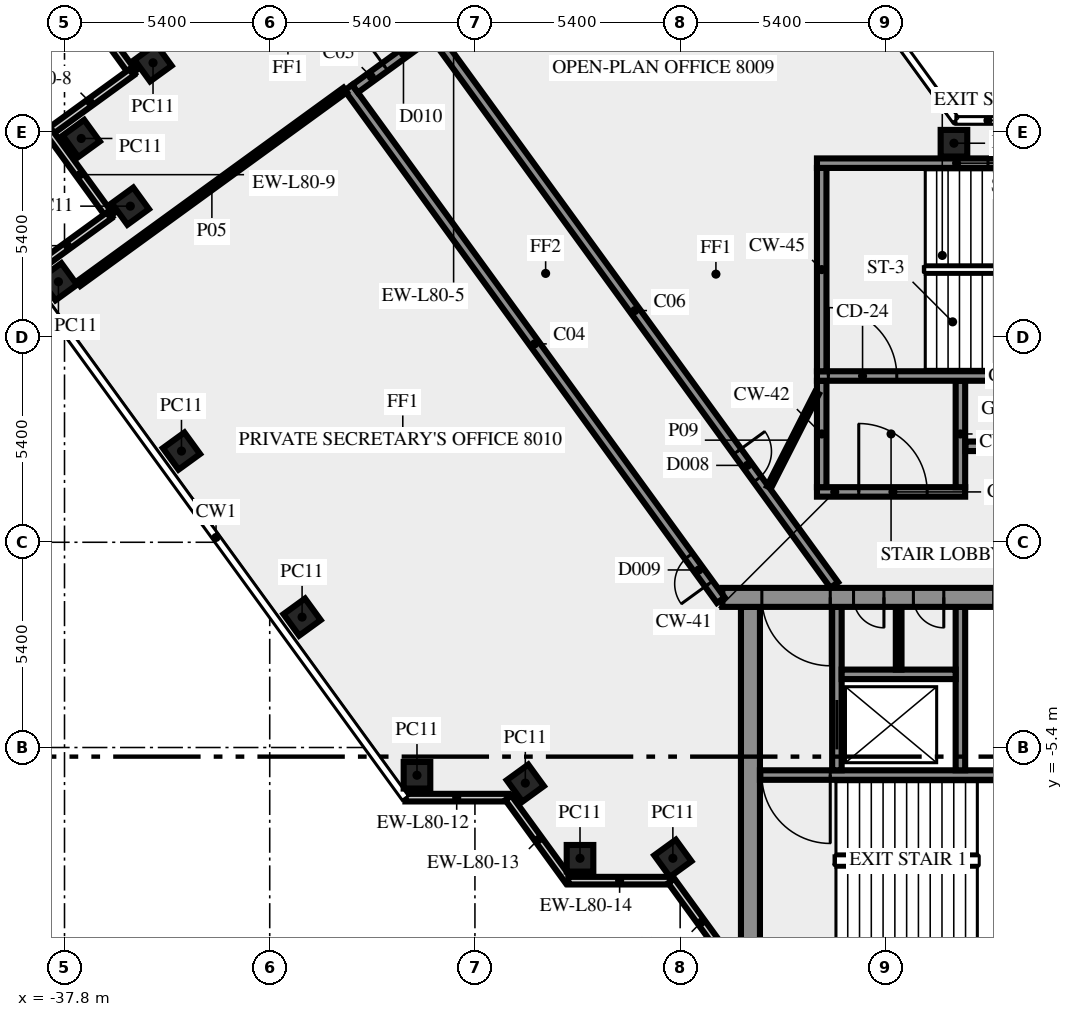
"""IFC4 building model, lengths in metres.
Left out: names, types, materials, properties, quantities, classifications, styles, units other than length and angle.
Written with IfcOpenShell. Run it as: python <this file> out.ifc"""

import sys

from ifc_helpers import new_model, si_unit, direction, frame, frame_2d, origin, origin_2d, place, context, subcontext, project, spatial, rectangle, extrude, element, fill, save


model = new_model("IFC4")
c1 = context("Model", 3, precision=1e-05, world=origin(), true_north=direction((0.0, 1.0)))
c2 = subcontext(c1, "Body", "Model", "MODEL_VIEW")
j1 = project(units=[si_unit("LENGTHUNIT", "METRE"), si_unit("PLANEANGLEUNIT", "RADIAN")], contexts=[c1])
p1 = place(None, origin())
s1 = spatial("IfcSite", under=j1, at=p1, CompositionType="ELEMENT")
p2 = place(p1, origin())
s2 = spatial("IfcBuilding", under=s1, at=p2, CompositionType="ELEMENT")
p3 = place(p2, frame((0.0, 0.0, 343.0)))
s3 = spatial("IfcBuildingStorey", under=s2, at=p3, CompositionType="ELEMENT", Elevation=343.0)
for number, where, z_axis, x_axis in (
    (1, (-35.471, 12.616, 0.0), (0.0, 0.0, 1.0), (-0.809, -0.588, 0.0)),
    (2, (-37.36, 10.625, 0.0), (0.0, 0.0, 1.0), (0.588, -0.809, 0.0)),
    (3, (-36.068, 8.844, 0.0), (0.0, 0.0, 1.0), (0.588, -0.809, 0.0)),
    (4, (-37.96, 6.855, 0.0), (0.0, 0.0, 1.0), (0.588, -0.809, 0.0)),
    (5, (-34.722, 2.4, 0.0), (0.0, 0.0, 1.0), (0.588, -0.809, 0.0)),
    (6, (-31.548, -1.969, 0.0), (0.0, 0.0, 1.0), (0.588, -0.809, 0.0)),
    (7, (-28.525, -6.13, 0.0), (0.0, 0.0, 1.0), (1.0, 0.0, 0.0)),
    (8, (-25.674, -6.337, 0.0), (0.0, 0.0, 1.0), (0.588, -0.809, 0.0)),
    (9, (-24.235, -8.315, 0.0), (0.0, 0.0, 1.0), (1.0, 0.0, 0.0)),
    (10, (-21.792, -8.315, 0.0), (0.0, 0.0, 1.0), (0.588, -0.809, 0.0)),
    (11, (-14.395, 10.5, 0.0), (0.0, 0.0, 1.0), (-1.0, 0.0, 0.0)),
):
    element("IfcColumn", number, at=place(p3, frame(where, z_axis=z_axis, x_axis=x_axis)), inside=s3, PredefinedType="COLUMN", context=c2, shape_type="SweptSolid", body=[
        extrude(rectangle(XDim=0.7, YDim=0.7, at=origin_2d()), origin(), (0.0, 0.0, 1.0), 3.65),
    ])
for number, where, z_axis, x_axis in (
    (12, (-37.592, 14.536, 0.0), (0.0, 0.0, 1.0), (0.588, -0.809, 0.0)),
    (13, (-36.032, 12.369, 0.0), (0.0, 0.0, 1.0), (-0.809, -0.588, 0.0)),
    (14, (-38.189, 10.765, 0.0), (0.0, 0.0, 1.0), (0.588, -0.809, 0.0)),
    (15, (-36.629, 8.597, 0.0), (0.0, 0.0, 1.0), (-0.809, -0.588, 0.0)),
    (16, (-28.83, -6.719, 0.0), (0.0, 0.0, 1.0), (1.0, 0.0, 0.0)),
):
    element("IfcWall", number, at=place(p3, frame(where, z_axis=z_axis, x_axis=x_axis)), inside=s3, PredefinedType="SOLIDWALL", context=c2, shape_type="SweptSolid", body=[
        extrude(rectangle(XDim=2.7, YDim=0.2, at=frame_2d((1.35, 0.0))), origin(), (0.0, 0.0, 1.0), 3.65),
    ])
p4 = place(p3, frame((-26.12, -6.724, 0.0), z_axis=(0.0, 0.0, 1.0), x_axis=(0.587720002413, -0.809064397168, 0.0)))
e17 = element("IfcWall", 17, at=p4, inside=s3, PredefinedType="SOLIDWALL", context=c2, shape_type="SweptSolid", body=[
    extrude(rectangle(XDim=2.7, YDim=0.2, at=frame_2d((1.35, 0.0))), origin(), (0.0, 0.0, 1.0), 3.65),
])
p5 = place(p3, frame((-24.543, -8.904, 0.0), z_axis=(0.0, 0.0, 1.0), x_axis=(1.0, 0.0, 0.0)))
e18 = element("IfcWall", 18, at=p5, inside=s3, PredefinedType="SOLIDWALL", context=c2, shape_type="SweptSolid", body=[
    extrude(rectangle(XDim=2.7, YDim=0.2, at=frame_2d((1.35, 0.0))), origin(), (0.0, 0.0, 1.0), 3.65),
])
p6 = place(p3, frame((-21.833, -8.909, 0.0), z_axis=(0.0, 0.0, 1.0), x_axis=(0.587766567315, -0.809030569476, 0.0)))
e19 = element("IfcWall", 19, at=p6, inside=s3, PredefinedType="SOLIDWALL", context=c2, shape_type="SweptSolid", body=[
    extrude(rectangle(XDim=2.688, YDim=0.2, at=frame_2d((1.344, 0.0))), origin(), (0.0, 0.0, 1.0), 3.65),
])
p7 = place(p3, frame((-19.75, -10.5, 0.0), z_axis=(0.0, 0.0, 1.0), x_axis=(0.0, 1.0, 0.0)))
e20 = element("IfcWall", 20, at=p7, inside=s3, PredefinedType="SHEAR", context=c2, shape_type="SweptSolid", body=[
    extrude(rectangle(XDim=8.8, YDim=0.5, at=frame_2d((4.4, 0.0))), origin(), (0.0, 0.0, 1.0), 3.65),
])
p8 = place(p3, frame((-11.45, -6.125, 0.0), z_axis=(0.0, 0.0, 1.0), x_axis=(-1.0, 0.0, 0.0)))
e21 = element("IfcWall", 21, at=p8, inside=s3, PredefinedType="SHEAR", context=c2, shape_type="SweptSolid", body=[
    extrude(rectangle(XDim=8.05, YDim=0.25, at=frame_2d((4.025, 0.0))), origin(), (0.0, 0.0, 1.0), 3.65),
])
p9 = place(p8, frame((6.2, 0.0, 0.0)))
e22 = element("IfcOpeningElement", 22, at=p9, cuts=e21, PredefinedType="OPENING", context=c2, shape_type="SweptSolid", body=[
    extrude(rectangle(XDim=1.8, YDim=2.1, at=frame_2d((0.9, 1.05))), frame((0.0, 0.135, 0.0), z_axis=(0.0, -1.0, 0.0), x_axis=(1.0, 0.0, 0.0)), (0.0, 0.0, 1.0), 0.27),
])
p10 = place(p3, frame((-17.475, -6.0, 0.0), z_axis=(0.0, 0.0, 1.0), x_axis=(0.0, 1.0, 0.0)))
e23 = element("IfcWall", 23, at=p10, inside=s3, PredefinedType="SHEAR", context=c2, shape_type="SweptSolid", body=[
    extrude(rectangle(XDim=4.3, YDim=0.25, at=frame_2d((2.15, 0.0))), origin(), (0.0, 0.0, 1.0), 3.65),
])
p11 = place(p10, frame((0.55, 0.0, 0.0)))
e24 = element("IfcOpeningElement", 24, at=p11, cuts=e23, PredefinedType="OPENING", context=c2, shape_type="SweptSolid", body=[
    extrude(rectangle(XDim=1.3, YDim=2.1, at=frame_2d((0.65, 1.05))), frame((0.0, 0.135, 0.0), z_axis=(0.0, -1.0, 0.0), x_axis=(1.0, 0.0, 0.0)), (0.0, 0.0, 1.0), 0.27),
])
p12 = place(p3, frame((-14.225, -6.0, 0.0), z_axis=(0.0, 0.0, 1.0), x_axis=(0.0, 1.0, 0.0)))
e25 = element("IfcWall", 25, at=p12, inside=s3, PredefinedType="SHEAR", context=c2, shape_type="SweptSolid", body=[
    extrude(rectangle(XDim=4.3, YDim=0.25, at=frame_2d((2.15, 0.0))), origin(), (0.0, 0.0, 1.0), 3.65),
])
p13 = place(p3, frame((-17.35, -3.475, 0.0), z_axis=(0.0, 0.0, 1.0), x_axis=(1.0, 0.0, 0.0)))
e26 = element("IfcWall", 26, at=p13, inside=s3, PredefinedType="SHEAR", context=c2, shape_type="SweptSolid", body=[
    extrude(rectangle(XDim=3.0, YDim=0.25, at=frame_2d((1.5, 0.0))), origin(), (0.0, 0.0, 1.0), 3.65),
])
p14 = place(p3, frame((-15.85, -3.35, 0.0), z_axis=(0.0, 0.0, 1.0), x_axis=(0.0, 1.0, 0.0)))
e27 = element("IfcWall", 27, at=p14, inside=s3, PredefinedType="PARTITIONING", context=c2, shape_type="SweptSolid", body=[
    extrude(rectangle(XDim=1.65, YDim=0.15, at=frame_2d((0.825, 0.0))), origin(), (0.0, 0.0, 1.0), 3.65),
])
p15 = place(p3, frame((20.49, -1.45, 0.0), z_axis=(0.0, 0.0, 1.0), x_axis=(-1.0, 0.0, 0.0)))
e28 = element("IfcWall", 28, at=p15, inside=s3, PredefinedType="SHEAR", context=c2, shape_type="SweptSolid", body=[
    extrude(rectangle(XDim=40.98, YDim=0.5, at=frame_2d((20.49, 0.0))), origin(), (0.0, 0.0, 1.0), 3.65),
])
p16 = place(p15, frame((38.14, 0.0, 0.0)))
e29 = element("IfcOpeningElement", 29, at=p16, cuts=e28, PredefinedType="OPENING", context=c2, shape_type="SweptSolid", body=[
    extrude(rectangle(XDim=1.8, YDim=2.1, at=frame_2d((0.9, 1.05))), frame((0.0, 0.26, 0.0), z_axis=(0.0, -1.0, 0.0), x_axis=(1.0, 0.0, 0.0)), (0.0, 0.0, 1.0), 0.52),
])
p17 = place(p15, frame((36.728, 0.0, 0.0)))
e30 = element("IfcOpeningElement", 30, at=p17, cuts=e28, PredefinedType="OPENING", context=c2, shape_type="SweptSolid", body=[
    extrude(rectangle(XDim=0.8, YDim=2.1, at=frame_2d((0.4, 1.05))), frame((0.0, 0.26, 0.0), z_axis=(0.0, -1.0, 0.0), x_axis=(1.0, 0.0, 0.0)), (0.0, 0.0, 1.0), 0.52),
])
p18 = place(p15, frame((35.153, 0.0, 0.0)))
e31 = element("IfcOpeningElement", 31, at=p18, cuts=e28, PredefinedType="OPENING", context=c2, shape_type="SweptSolid", body=[
    extrude(rectangle(XDim=0.8, YDim=2.1, at=frame_2d((0.4, 1.05))), frame((0.0, 0.26, 0.0), z_axis=(0.0, -1.0, 0.0), x_axis=(1.0, 0.0, 0.0)), (0.0, 0.0, 1.0), 0.52),
])
p19 = place(p15, frame((32.94, 0.0, 0.0)))
e32 = element("IfcOpeningElement", 32, at=p19, cuts=e28, PredefinedType="OPENING", context=c2, shape_type="SweptSolid", body=[
    extrude(rectangle(XDim=0.9, YDim=2.1, at=frame_2d((0.45, 1.05))), frame((0.0, 0.26, 0.0), z_axis=(0.0, -1.0, 0.0), x_axis=(1.0, 0.0, 0.0)), (0.0, 0.0, 1.0), 0.52),
])
p20 = place(p15, frame((31.015, 0.0, 0.0)))
e33 = element("IfcOpeningElement", 33, at=p20, cuts=e28, PredefinedType="OPENING", context=c2, shape_type="SweptSolid", body=[
    extrude(rectangle(XDim=0.8, YDim=2.1, at=frame_2d((0.4, 1.05))), frame((0.0, 0.26, 0.0), z_axis=(0.0, -1.0, 0.0), x_axis=(1.0, 0.0, 0.0)), (0.0, 0.0, 1.0), 0.52),
])
p21 = place(p15, frame((24.765, 0.0, 0.0)))
e34 = element("IfcOpeningElement", 34, at=p21, cuts=e28, PredefinedType="OPENING", context=c2, shape_type="SweptSolid", body=[
    extrude(rectangle(XDim=0.8, YDim=2.1, at=frame_2d((0.4, 1.05))), frame((0.0, 0.26, 0.0), z_axis=(0.0, -1.0, 0.0), x_axis=(1.0, 0.0, 0.0)), (0.0, 0.0, 1.0), 0.52),
])
p22 = place(p15, frame((21.765, 0.0, 0.0)))
e35 = element("IfcOpeningElement", 35, at=p22, cuts=e28, PredefinedType="OPENING", context=c2, shape_type="SweptSolid", body=[
    extrude(rectangle(XDim=2.0, YDim=2.1, at=frame_2d((1.0, 1.05))), frame((0.0, 0.26, 0.0), z_axis=(0.0, -1.0, 0.0), x_axis=(1.0, 0.0, 0.0)), (0.0, 0.0, 1.0), 0.52),
])
p23 = place(p15, frame((14.002, 0.0, 0.0)))
e36 = element("IfcOpeningElement", 36, at=p23, cuts=e28, PredefinedType="OPENING", context=c2, shape_type="SweptSolid", body=[
    extrude(rectangle(XDim=0.9, YDim=2.1, at=frame_2d((0.45, 1.05))), frame((0.0, 0.26, 0.0), z_axis=(0.0, -1.0, 0.0), x_axis=(1.0, 0.0, 0.0)), (0.0, 0.0, 1.0), 0.52),
])
p24 = place(p15, frame((10.278, 0.0, 0.0)))
e37 = element("IfcOpeningElement", 37, at=p24, cuts=e28, PredefinedType="OPENING", context=c2, shape_type="SweptSolid", body=[
    extrude(rectangle(XDim=0.9, YDim=2.1, at=frame_2d((0.45, 1.05))), frame((0.0, 0.26, 0.0), z_axis=(0.0, -1.0, 0.0), x_axis=(1.0, 0.0, 0.0)), (0.0, 0.0, 1.0), 0.52),
])
p25 = place(p15, frame((7.14, 0.0, 0.0)))
e38 = element("IfcOpeningElement", 38, at=p25, cuts=e28, PredefinedType="OPENING", context=c2, shape_type="SweptSolid", body=[
    extrude(rectangle(XDim=0.9, YDim=2.1, at=frame_2d((0.45, 1.05))), frame((0.0, 0.26, 0.0), z_axis=(0.0, -1.0, 0.0), x_axis=(1.0, 0.0, 0.0)), (0.0, 0.0, 1.0), 0.52),
])
p26 = place(p15, frame((4.19, 0.0, 0.0)))
e39 = element("IfcOpeningElement", 39, at=p26, cuts=e28, PredefinedType="OPENING", context=c2, shape_type="SweptSolid", body=[
    extrude(rectangle(XDim=0.9, YDim=2.1, at=frame_2d((0.45, 1.05))), frame((0.0, 0.26, 0.0), z_axis=(0.0, -1.0, 0.0), x_axis=(1.0, 0.0, 0.0)), (0.0, 0.0, 1.0), 0.52),
])
p27 = place(p15, frame((1.04, 0.0, 0.0)))
e40 = element("IfcOpeningElement", 40, at=p27, cuts=e28, PredefinedType="OPENING", context=c2, shape_type="SweptSolid", body=[
    extrude(rectangle(XDim=1.8, YDim=2.1, at=frame_2d((0.9, 1.05))), frame((0.0, 0.26, 0.0), z_axis=(0.0, -1.0, 0.0), x_axis=(1.0, 0.0, 0.0)), (0.0, 0.0, 1.0), 0.52),
])
p28 = place(p3, frame((-18.0, 1.325, 0.0), z_axis=(0.0, 0.0, 1.0), x_axis=(1.0, 0.0, 0.0)))
e41 = element("IfcWall", 41, at=p28, inside=s3, PredefinedType="SHEAR", context=c2, shape_type="SweptSolid", body=[
    extrude(rectangle(XDim=3.9, YDim=0.25, at=frame_2d((1.95, 0.0))), origin(), (0.0, 0.0, 1.0), 3.65),
])
p29 = place(p28, frame((1.1, 0.0, 0.0)))
e42 = element("IfcOpeningElement", 42, at=p29, cuts=e41, PredefinedType="OPENING", context=c2, shape_type="SweptSolid", body=[
    extrude(rectangle(XDim=1.8, YDim=2.1, at=frame_2d((0.9, 1.05))), frame((0.0, 0.135, 0.0), z_axis=(0.0, -1.0, 0.0), x_axis=(1.0, 0.0, 0.0)), (0.0, 0.0, 1.0), 0.27),
])
for number, where, z_axis, x_axis in (
    (43, (-17.875, 1.45, 0.0), (0.0, 0.0, 1.0), (0.0, 1.0, 0.0)),
    (44, (-14.225, 1.45, 0.0), (0.0, 0.0, 1.0), (0.0, 1.0, 0.0)),
):
    element("IfcWall", number, at=place(p3, frame(where, z_axis=z_axis, x_axis=x_axis)), inside=s3, PredefinedType="SHEAR", context=c2, shape_type="SweptSolid", body=[
        extrude(rectangle(XDim=2.8, YDim=0.25, at=frame_2d((1.4, 0.0))), origin(), (0.0, 0.0, 1.0), 3.65),
    ])
p30 = place(p3, frame((-18.0, 4.375, 0.0), z_axis=(0.0, 0.0, 1.0), x_axis=(1.0, 0.0, 0.0)))
e45 = element("IfcWall", 45, at=p30, inside=s3, PredefinedType="SHEAR", context=c2, shape_type="SweptSolid", body=[
    extrude(rectangle(XDim=10.5, YDim=0.25, at=frame_2d((5.25, 0.0))), origin(), (0.0, 0.0, 1.0), 3.65),
])
p31 = place(p30, frame((0.3, 0.0, 0.0)))
e46 = element("IfcOpeningElement", 46, at=p31, cuts=e45, PredefinedType="OPENING", context=c2, shape_type="SweptSolid", body=[
    extrude(rectangle(XDim=1.8, YDim=2.1, at=frame_2d((0.9, 1.05))), frame((0.0, 0.135, 0.0), z_axis=(0.0, -1.0, 0.0), x_axis=(1.0, 0.0, 0.0)), (0.0, 0.0, 1.0), 0.27),
])
p32 = place(p3, frame((-17.875, 4.5, 0.0), z_axis=(0.0, 0.0, 1.0), x_axis=(0.0, 1.0, 0.0)))
e47 = element("IfcWall", 47, at=p32, inside=s3, PredefinedType="SHEAR", context=c2, shape_type="SweptSolid", body=[
    extrude(rectangle(XDim=5.35, YDim=0.25, at=frame_2d((2.675, 0.0))), origin(), (0.0, 0.0, 1.0), 3.65),
])
p33 = place(p3, frame((-18.0, 9.975, 0.0), z_axis=(0.0, 0.0, 1.0), x_axis=(1.0, 0.0, 0.0)))
e48 = element("IfcWall", 48, at=p33, inside=s3, PredefinedType="SHEAR", context=c2, shape_type="SweptSolid", body=[
    extrude(rectangle(XDim=10.5, YDim=0.25, at=frame_2d((5.25, 0.0))), origin(), (0.0, 0.0, 1.0), 3.65),
])
p34 = place(p33, frame((4.5, 0.0, 1.0)))
e49 = element("IfcOpeningElement", 49, at=p34, cuts=e48, PredefinedType="OPENING", context=c2, shape_type="SweptSolid", body=[
    extrude(rectangle(XDim=1.2, YDim=1.2, at=frame_2d((0.6, 0.6))), frame((0.0, 0.135, 0.0), z_axis=(0.0, -1.0, 0.0), x_axis=(1.0, 0.0, 0.0)), (0.0, 0.0, 1.0), 0.27),
])
p35 = place(p3, frame((-20.531, -1.523, 0.0), z_axis=(0.0, 0.0, 1.0), x_axis=(-0.587785867777, 0.809016547199, 0.0)))
e50 = element("IfcWall", 50, at=p35, inside=s3, PredefinedType="SOLIDWALL", context=c2, shape_type="SweptSolid", body=[
    extrude(rectangle(XDim=16.67, YDim=0.25, at=frame_2d((8.335, 0.0))), origin(), (0.0, 0.0, 1.0), 3.65),
])
p36 = place(p35, frame((0.533, 0.0, 0.0)))
e51 = element("IfcOpeningElement", 51, at=p36, cuts=e50, PredefinedType="OPENING", context=c2, shape_type="SweptSolid", body=[
    extrude(rectangle(XDim=0.9, YDim=2.1, at=frame_2d((0.45, 1.05))), frame((0.0, 0.135, 0.0), z_axis=(0.0, -1.0, 0.0), x_axis=(1.0, 0.0, 0.0)), (0.0, 0.0, 1.0), 0.27),
])
p37 = place(p3, frame((-30.155, 11.936, 0.0), z_axis=(0.0, 0.0, 1.0), x_axis=(0.809038743598, 0.587755315891, 0.0)))
e52 = element("IfcWall", 52, at=p37, inside=s3, PredefinedType="SOLIDWALL", context=c2, shape_type="SweptSolid", body=[
    extrude(rectangle(XDim=2.65, YDim=0.25, at=frame_2d((1.325, 0.0))), origin(), (0.0, 0.0, 1.0), 3.65),
])
p38 = place(p37, frame((0.976, 0.0, 0.0)))
e53 = element("IfcOpeningElement", 53, at=p38, cuts=e52, PredefinedType="OPENING", context=c2, shape_type="SweptSolid", body=[
    extrude(rectangle(XDim=1.2, YDim=2.1, at=frame_2d((0.6, 1.05))), frame((0.0, 0.135, 0.0), z_axis=(0.0, -1.0, 0.0), x_axis=(1.0, 0.0, 0.0)), (0.0, 0.0, 1.0), 0.27),
])
p39 = place(p3, frame((-28.039, 13.319, 0.0), z_axis=(0.0, 0.0, 1.0), x_axis=(0.587791911753, -0.809012155952, 0.0)))
e54 = element("IfcWall", 54, at=p39, inside=s3, PredefinedType="SOLIDWALL", context=c2, shape_type="SweptSolid", body=[
    extrude(rectangle(XDim=17.853, YDim=0.25, at=frame_2d((8.927, 0.0))), origin(), (0.0, 0.0, 1.0), 3.65),
])
p40 = place(p39, frame((13.512, 0.0, 0.0)))
e55 = element("IfcOpeningElement", 55, at=p40, cuts=e54, PredefinedType="OPENING", context=c2, shape_type="SweptSolid", body=[
    extrude(rectangle(XDim=0.9, YDim=2.1, at=frame_2d((0.45, 1.05))), frame((0.0, 0.135, 0.0), z_axis=(0.0, -1.0, 0.0), x_axis=(1.0, 0.0, 0.0)), (0.0, 0.0, 1.0), 0.27),
])
p41 = place(p3, frame((-14.09, 2.525, 0.0), z_axis=(0.0, 0.0, 1.0), x_axis=(1.0, 0.0, 0.0)))
e56 = element("IfcWall", 56, at=p41, inside=s3, PredefinedType="SOLIDWALL", context=c2, shape_type="SweptSolid", body=[
    extrude(rectangle(XDim=8.84, YDim=0.25, at=frame_2d((4.42, 0.0))), origin(), (0.0, 0.0, 1.0), 3.65),
])
p42 = place(p3, frame((-37.429, 6.805, 0.0), z_axis=(0.0, 0.0, 1.0), x_axis=(0.809020922653, 0.587779845444, 0.0)))
e57 = element("IfcWall", 57, at=p42, inside=s3, PredefinedType="PARTITIONING", context=c2, shape_type="SweptSolid", body=[
    extrude(rectangle(XDim=8.67, YDim=0.15, at=frame_2d((4.335, 0.0))), origin(), (0.0, 0.0, 1.0), 3.65),
])
p43 = place(p3, frame((-19.261, 1.45, 0.0), z_axis=(0.0, 0.0, 1.0), x_axis=(0.453950796792, 0.891026752736, 0.0)))
e58 = element("IfcWall", 58, at=p43, inside=s3, PredefinedType="PARTITIONING", context=c2, shape_type="SweptSolid", body=[
    extrude(rectangle(XDim=2.778, YDim=0.12, at=frame_2d((1.389, 0.0))), origin(), (0.0, 0.0, 1.0), 3.65),
])
p44 = place(p9, origin())
e59 = element("IfcDoor", 59, at=p44, inside=s3, OperationType="DOUBLE_DOOR_SINGLE_SWING", PredefinedType="DOOR", context=c2, shape_type="SweptSolid", body=[
    extrude(rectangle(XDim=1.8, YDim=2.1, at=frame_2d((0.9, 1.05))), frame((0.0, 0.025, 0.0), z_axis=(0.0, -1.0, 0.0), x_axis=(1.0, 0.0, 0.0)), (0.0, 0.0, 1.0), 0.05),
])
fill(e22, e59)
p45 = place(p11, origin())
e60 = element("IfcDoor", 60, at=p45, inside=s3, OperationType="DOUBLE_DOOR_SLIDING", PredefinedType="DOOR", context=c2, shape_type="SweptSolid", body=[
    extrude(rectangle(XDim=1.3, YDim=2.1, at=frame_2d((0.65, 1.05))), frame((0.0, 0.025, 0.0), z_axis=(0.0, -1.0, 0.0), x_axis=(1.0, 0.0, 0.0)), (0.0, 0.0, 1.0), 0.05),
])
fill(e24, e60)
p46 = place(p16, origin())
e61 = element("IfcDoor", 61, at=p46, inside=s3, OperationType="DOUBLE_DOOR_SINGLE_SWING", PredefinedType="DOOR", context=c2, shape_type="SweptSolid", body=[
    extrude(rectangle(XDim=1.8, YDim=2.1, at=frame_2d((0.9, 1.05))), frame((0.0, 0.025, 0.0), z_axis=(0.0, -1.0, 0.0), x_axis=(1.0, 0.0, 0.0)), (0.0, 0.0, 1.0), 0.05),
])
fill(e29, e61)
p47 = place(p17, origin())
e62 = element("IfcDoor", 62, at=p47, inside=s3, OperationType="SINGLE_SWING_RIGHT", PredefinedType="DOOR", context=c2, shape_type="SweptSolid", body=[
    extrude(rectangle(XDim=0.8, YDim=2.1, at=frame_2d((0.4, 1.05))), frame((0.0, 0.025, 0.0), z_axis=(0.0, -1.0, 0.0), x_axis=(1.0, 0.0, 0.0)), (0.0, 0.0, 1.0), 0.05),
])
fill(e30, e62)
p48 = place(p18, origin())
e63 = element("IfcDoor", 63, at=p48, inside=s3, OperationType="SINGLE_SWING_RIGHT", PredefinedType="DOOR", context=c2, shape_type="SweptSolid", body=[
    extrude(rectangle(XDim=0.8, YDim=2.1, at=frame_2d((0.4, 1.05))), frame((0.0, 0.025, 0.0), z_axis=(0.0, -1.0, 0.0), x_axis=(1.0, 0.0, 0.0)), (0.0, 0.0, 1.0), 0.05),
])
fill(e31, e63)
p49 = place(p29, origin())
e64 = element("IfcDoor", 64, at=p49, inside=s3, OperationType="DOUBLE_DOOR_SINGLE_SWING", PredefinedType="DOOR", context=c2, shape_type="SweptSolid", body=[
    extrude(rectangle(XDim=1.8, YDim=2.1, at=frame_2d((0.9, 1.05))), frame((0.0, 0.025, 0.0), z_axis=(0.0, -1.0, 0.0), x_axis=(1.0, 0.0, 0.0)), (0.0, 0.0, 1.0), 0.05),
])
fill(e42, e64)
p50 = place(p31, origin())
e65 = element("IfcDoor", 65, at=p50, inside=s3, OperationType="DOUBLE_DOOR_SINGLE_SWING", PredefinedType="DOOR", context=c2, shape_type="SweptSolid", body=[
    extrude(rectangle(XDim=1.8, YDim=2.1, at=frame_2d((0.9, 1.05))), frame((0.0, 0.025, 0.0), z_axis=(0.0, -1.0, 0.0), x_axis=(1.0, 0.0, 0.0)), (0.0, 0.0, 1.0), 0.05),
])
fill(e46, e65)
p51 = place(p34, origin())
e66 = element("IfcWindow", 66, at=p51, inside=s3, PartitioningType="SINGLE_PANEL", PredefinedType="WINDOW", context=c2, shape_type="SweptSolid", body=[
    extrude(rectangle(XDim=1.2, YDim=1.2, at=frame_2d((0.6, 0.6))), frame((0.0, 0.03, 0.0), z_axis=(0.0, -1.0, 0.0), x_axis=(1.0, 0.0, 0.0)), (0.0, 0.0, 1.0), 0.06),
])
fill(e49, e66)
p52 = place(p40, origin())
e67 = element("IfcDoor", 67, at=p52, inside=s3, OperationType="SINGLE_SWING_RIGHT", PredefinedType="DOOR", context=c2, shape_type="SweptSolid", body=[
    extrude(rectangle(XDim=0.9, YDim=2.1, at=frame_2d((0.45, 1.05))), frame((0.0, 0.025, 0.0), z_axis=(0.0, -1.0, 0.0), x_axis=(1.0, 0.0, 0.0)), (0.0, 0.0, 1.0), 0.05),
])
fill(e55, e67)
p53 = place(p38, origin())
e68 = element("IfcDoor", 68, at=p53, inside=s3, OperationType="SINGLE_SWING_RIGHT", PredefinedType="DOOR", context=c2, shape_type="SweptSolid", body=[
    extrude(rectangle(XDim=1.2, YDim=2.1, at=frame_2d((0.6, 1.05))), frame((0.0, 0.025, 0.0), z_axis=(0.0, -1.0, 0.0), x_axis=(1.0, 0.0, 0.0)), (0.0, 0.0, 1.0), 0.05),
])
fill(e53, e68)
p54 = place(p36, origin())
e69 = element("IfcDoor", 69, at=p54, inside=s3, OperationType="SINGLE_SWING_LEFT", PredefinedType="DOOR", context=c2, shape_type="SweptSolid", body=[
    extrude(rectangle(XDim=0.9, YDim=2.1, at=frame_2d((0.45, 1.05))), frame((0.0, 0.025, 0.0), z_axis=(0.0, -1.0, 0.0), x_axis=(1.0, 0.0, 0.0)), (0.0, 0.0, 1.0), 0.05),
])
fill(e51, e69)
save(model, sys.argv[1])
